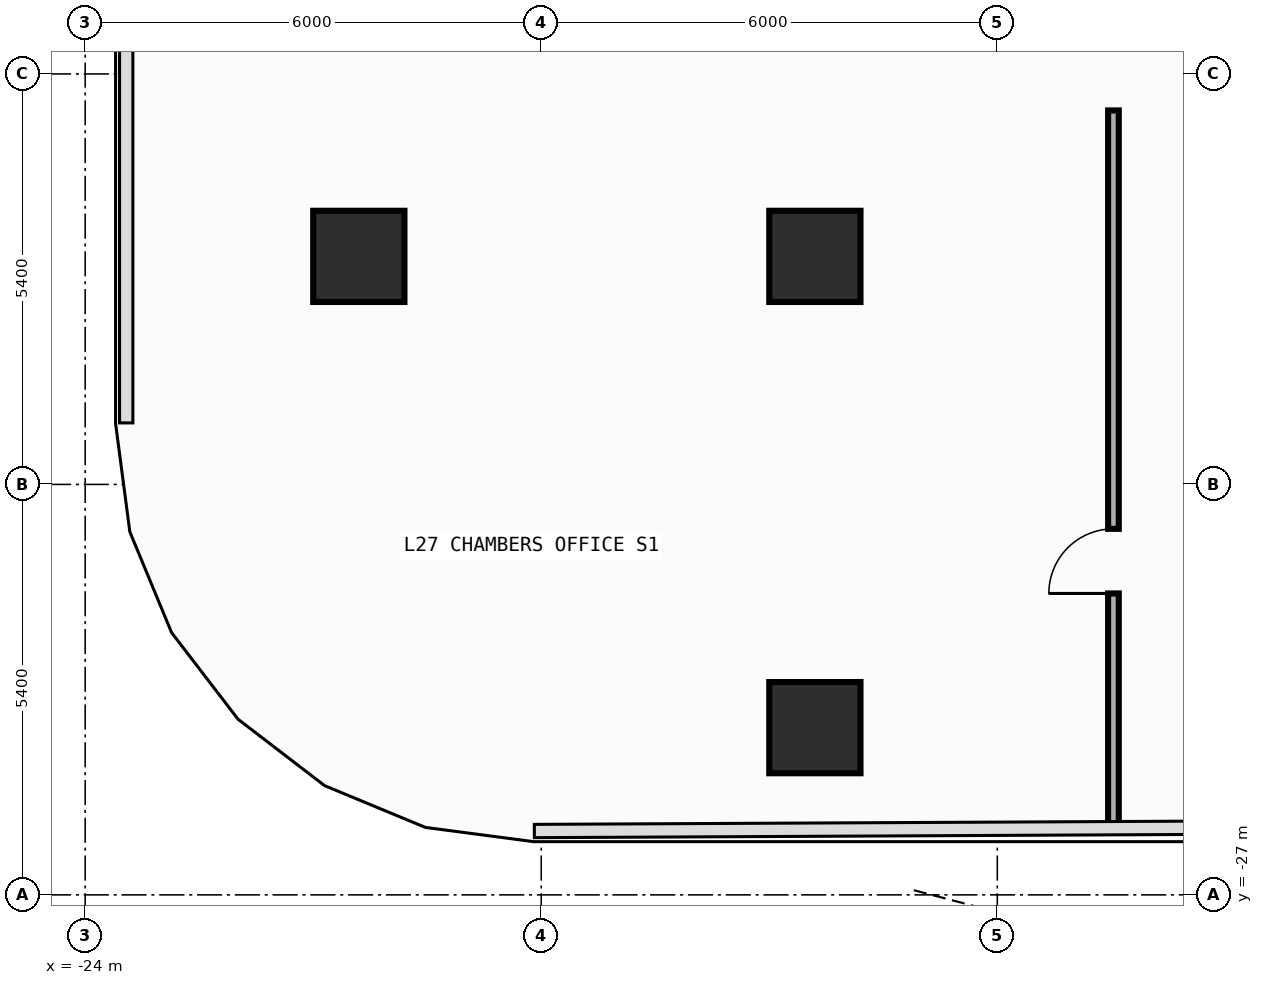
"""IFC4 building model, lengths in metres.
Left out: names, types, materials, properties, quantities, classifications, styles, units other than length and angle.
Written with IfcOpenShell. Run it as: python <this file> out.ifc"""

import sys

from ifc_helpers import new_model, si_unit, direction, frame, frame_2d, origin, origin_2d, place, context, subcontext, project, spatial, rectangle, extrude, element, fill, save


model = new_model("IFC4")
c1 = context("Model", 3, precision=1e-05, world=origin(), true_north=direction((0.0, 1.0)))
c2 = subcontext(c1, "Body", "Model", "MODEL_VIEW")
j1 = project(units=[si_unit("LENGTHUNIT", "METRE"), si_unit("PLANEANGLEUNIT", "RADIAN")], contexts=[c1])
p1 = place(None, origin())
s1 = spatial("IfcSite", under=j1, at=p1, CompositionType="ELEMENT")
p2 = place(p1, origin())
s2 = spatial("IfcBuilding", under=s1, at=p2, CompositionType="ELEMENT")
p3 = place(p2, frame((0.0, 0.0, 118.4)))
s3 = spatial("IfcBuildingStorey", under=s2, at=p3, CompositionType="ELEMENT", Elevation=118.4)
for number, where, z_axis, x_axis in (
    (1, (-20.4, -18.6, 0.0), (0.0, 0.0, 1.0), (1.0, 0.0, 0.0)),
    (2, (-14.4, -18.6, 0.0), (0.0, 0.0, 1.0), (1.0, 0.0, 0.0)),
    (3, (-14.4, -24.8, 0.0), (0.0, 0.0, 1.0), (1.0, 0.0, 0.0)),
):
    element("IfcColumn", number, at=place(p3, frame(where, z_axis=z_axis, x_axis=x_axis)), inside=s3, PredefinedType="COLUMN", context=c2, shape_type="SweptSolid", body=[
        extrude(rectangle(XDim=1.2, YDim=1.2, at=origin_2d()), origin(), (0.0, 0.0, 1.0), 4.2),
    ])
p4 = place(p3, frame((-10.472, -26.118, 0.0), z_axis=(0.0, 0.0, 1.0), x_axis=(0.0, 1.0, 0.0)))
e4 = element("IfcWall", 4, at=p4, inside=s3, PredefinedType="PARTITIONING", context=c2, shape_type="SweptSolid", body=[
    extrude(rectangle(XDim=9.438, YDim=0.14, at=frame_2d((4.719, 0.0))), origin(), (0.0, 0.0, 1.0), 3.94),
])
p5 = place(p4, frame((3.083, 0.0, 0.0)))
e5 = element("IfcOpeningElement", 5, at=p5, cuts=e4, PredefinedType="OPENING", context=c2, shape_type="SweptSolid", body=[
    extrude(rectangle(XDim=0.85, YDim=2.1, at=frame_2d((0.425, 1.05))), frame((0.0, 0.08, 0.0), z_axis=(0.0, -1.0, 0.0), x_axis=(1.0, 0.0, 0.0)), (0.0, 0.0, 1.0), 0.16),
])
p6 = place(p5, origin())
e6 = element("IfcDoor", 6, at=p6, inside=s3, OperationType="SINGLE_SWING_LEFT", PredefinedType="DOOR", context=c2, shape_type="SweptSolid", body=[
    extrude(rectangle(XDim=0.85, YDim=2.1, at=frame_2d((0.425, 1.05))), frame((0.0, 0.025, 0.0), z_axis=(0.0, -1.0, 0.0), x_axis=(1.0, 0.0, 0.0)), (0.0, 0.0, 1.0), 0.05),
])
fill(e5, e6)
save(model, sys.argv[1])
